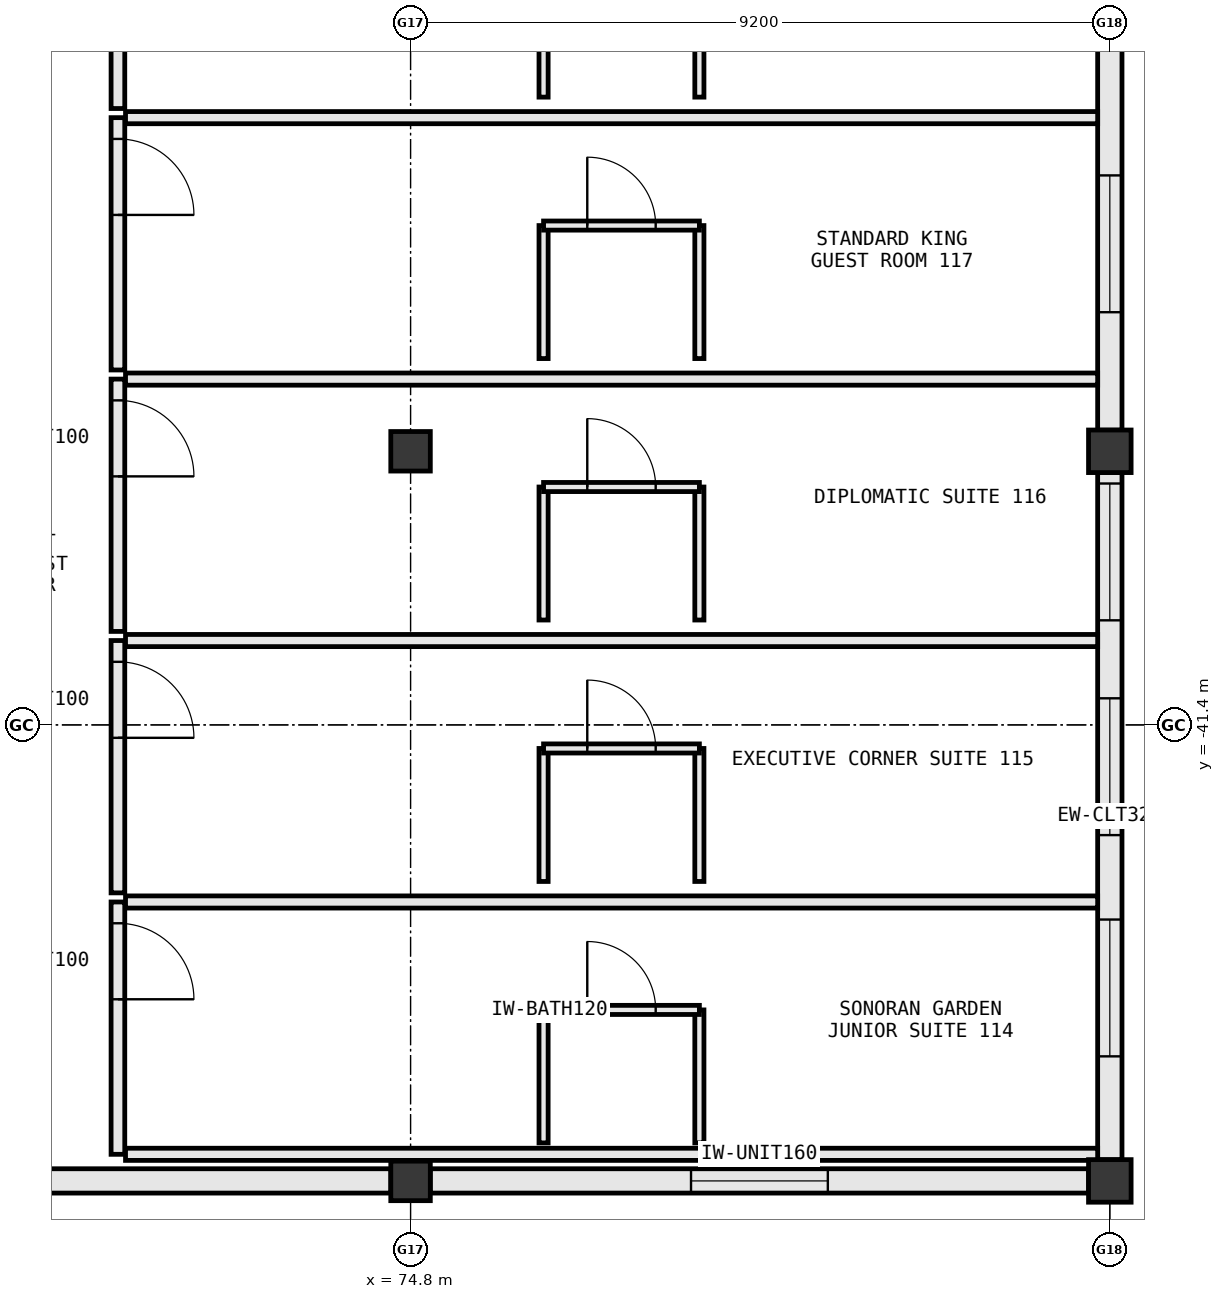
"""IFC4 building model, lengths in metres.
Left out: names, types, materials, properties, quantities, classifications, styles, units other than length and angle.
Written with IfcOpenShell. Run it as: python <this file> out.ifc"""

import sys

from ifc_helpers import new_model, si_unit, direction, frame, frame_2d, origin, origin_2d, place, context, subcontext, project, spatial, rectangle, extrude, element, fill, save


model = new_model("IFC4")
c1 = context("Model", 3, precision=1e-05, world=origin(), true_north=direction((0.0, 1.0)))
c2 = subcontext(c1, "Body", "Model", "MODEL_VIEW")
j1 = project(units=[si_unit("LENGTHUNIT", "METRE"), si_unit("PLANEANGLEUNIT", "RADIAN")], contexts=[c1])
p1 = place(None, origin())
s1 = spatial("IfcSite", under=j1, at=p1, CompositionType="ELEMENT")
p2 = place(p1, origin())
s2 = spatial("IfcBuilding", under=s1, at=p2, CompositionType="ELEMENT")
p3 = place(p2, frame((0.0, 0.0, 20.0)))
s3 = spatial("IfcBuildingStorey", under=s2, at=p3, CompositionType="ELEMENT", Elevation=20.0)
for number, where, z_axis, x_axis in (
    (1, (74.8, -47.4, 0.0), (0.0, 0.0, 1.0), (1.0, 0.0, 0.0)),
    (2, (74.8, -37.8, 0.0), (0.0, 0.0, 1.0), (1.0, 0.0, 0.0)),
):
    element("IfcColumn", number, at=place(p3, frame(where, z_axis=z_axis, x_axis=x_axis)), inside=s3, PredefinedType="COLUMN", context=c2, shape_type="SweptSolid", body=[
        extrude(rectangle(XDim=0.52, YDim=0.52, at=origin_2d()), origin(), (0.0, 0.0, 1.0), 3.8),
    ])
for number, where, z_axis, x_axis in (
    (3, (84.0, -47.4, 0.0), (0.0, 0.0, 1.0), (1.0, 0.0, 0.0)),
    (4, (84.0, -37.8, 0.0), (0.0, 0.0, 1.0), (1.0, 0.0, 0.0)),
):
    element("IfcColumn", number, at=place(p3, frame(where, z_axis=z_axis, x_axis=x_axis)), inside=s3, PredefinedType="COLUMN", context=c2, shape_type="SweptSolid", body=[
        extrude(rectangle(XDim=0.56, YDim=0.56, at=origin_2d()), origin(), (0.0, 0.0, 1.0), 3.8),
    ])
p4 = place(p3, frame((67.808, -47.4, 0.0), z_axis=(0.0, 0.0, 1.0), x_axis=(1.0, 0.0, 0.0)))
e5 = element("IfcWall", 5, at=p4, inside=s3, PredefinedType="STANDARD", context=c2, shape_type="SweptSolid", body=[
    extrude(rectangle(XDim=6.734, YDim=0.32, at=frame_2d((3.367, 0.0))), origin(), (0.0, 0.0, 1.0), 2.685),
])
p5 = place(p3, frame((75.058, -47.4, 0.0), z_axis=(0.0, 0.0, 1.0), x_axis=(1.0, 0.0, 0.0)))
e6 = element("IfcWall", 6, at=p5, inside=s3, PredefinedType="STANDARD", context=c2, shape_type="SweptSolid", body=[
    extrude(rectangle(XDim=8.664, YDim=0.32, at=frame_2d((4.332, 0.0))), origin(), (0.0, 0.0, 1.0), 2.905),
])
p6 = place(p5, frame((3.432, 0.0, 0.85)))
e7 = element("IfcOpeningElement", 7, at=p6, cuts=e6, PredefinedType="OPENING", context=c2, shape_type="SweptSolid", body=[
    extrude(rectangle(XDim=1.8, YDim=1.85, at=frame_2d((0.9, 0.925))), frame((0.0, 0.172, 0.0), z_axis=(0.0, -1.0, 0.0), x_axis=(1.0, 0.0, 0.0)), (0.0, 0.0, 1.0), 0.344),
])
p7 = place(p3, frame((84.0, -47.122, 0.0), z_axis=(0.0, 0.0, 1.0), x_axis=(0.0, 1.0, 0.0)))
e8 = element("IfcWall", 8, at=p7, inside=s3, PredefinedType="STANDARD", context=c2, shape_type="SweptSolid", body=[
    extrude(rectangle(XDim=9.044, YDim=0.32, at=frame_2d((4.522, 0.0))), origin(), (0.0, 0.0, 1.0), 2.965),
])
p8 = place(p7, frame((1.361, 0.0, 0.85)))
e9 = element("IfcOpeningElement", 9, at=p8, cuts=e8, PredefinedType="OPENING", context=c2, shape_type="SweptSolid", body=[
    extrude(rectangle(XDim=1.8, YDim=1.85, at=frame_2d((0.9, 0.925))), frame((0.0, 0.172, 0.0), z_axis=(0.0, -1.0, 0.0), x_axis=(1.0, 0.0, 0.0)), (0.0, 0.0, 1.0), 0.344),
])
p9 = place(p7, frame((4.272, 0.0, 0.85)))
e10 = element("IfcOpeningElement", 10, at=p9, cuts=e8, PredefinedType="OPENING", context=c2, shape_type="SweptSolid", body=[
    extrude(rectangle(XDim=1.8, YDim=1.85, at=frame_2d((0.9, 0.925))), frame((0.0, 0.172, 0.0), z_axis=(0.0, -1.0, 0.0), x_axis=(1.0, 0.0, 0.0)), (0.0, 0.0, 1.0), 0.344),
])
p10 = place(p7, frame((7.098, 0.0, 0.85)))
e11 = element("IfcOpeningElement", 11, at=p10, cuts=e8, PredefinedType="OPENING", context=c2, shape_type="SweptSolid", body=[
    extrude(rectangle(XDim=1.8, YDim=1.85, at=frame_2d((0.9, 0.925))), frame((0.0, 0.172, 0.0), z_axis=(0.0, -1.0, 0.0), x_axis=(1.0, 0.0, 0.0)), (0.0, 0.0, 1.0), 0.344),
])
p11 = place(p3, frame((84.0, -37.522, 0.0), z_axis=(0.0, 0.0, 1.0), x_axis=(0.0, 1.0, 0.0)))
e12 = element("IfcWall", 12, at=p11, inside=s3, PredefinedType="STANDARD", context=c2, shape_type="SweptSolid", body=[
    extrude(rectangle(XDim=9.044, YDim=0.32, at=frame_2d((4.522, 0.0))), origin(), (0.0, 0.0, 1.0), 2.965),
])
p12 = place(p11, frame((1.552, 0.0, 0.85)))
e13 = element("IfcOpeningElement", 13, at=p12, cuts=e12, PredefinedType="OPENING", context=c2, shape_type="SweptSolid", body=[
    extrude(rectangle(XDim=1.8, YDim=1.85, at=frame_2d((0.9, 0.925))), frame((0.0, 0.172, 0.0), z_axis=(0.0, -1.0, 0.0), x_axis=(1.0, 0.0, 0.0)), (0.0, 0.0, 1.0), 0.344),
])
p13 = place(p11, frame((4.992, 0.0, 0.85)))
e14 = element("IfcOpeningElement", 14, at=p13, cuts=e12, PredefinedType="OPENING", context=c2, shape_type="SweptSolid", body=[
    extrude(rectangle(XDim=1.8, YDim=1.85, at=frame_2d((0.9, 0.925))), frame((0.0, 0.172, 0.0), z_axis=(0.0, -1.0, 0.0), x_axis=(1.0, 0.0, 0.0)), (0.0, 0.0, 1.0), 0.344),
])
p14 = place(p3, frame((70.95, -43.73, 0.0), z_axis=(0.0, 0.0, 1.0), x_axis=(0.0, -1.0, 0.0)))
e15 = element("IfcWall", 15, at=p14, inside=s3, PredefinedType="PARTITIONING", context=c2, shape_type="SweptSolid", body=[
    extrude(rectangle(XDim=3.32, YDim=0.18, at=frame_2d((1.66, 0.0))), origin(), (0.0, 0.0, 1.0), 3.55),
])
p15 = place(p14, frame((0.28, 0.0, 0.0)))
e16 = element("IfcOpeningElement", 16, at=p15, cuts=e15, PredefinedType="OPENING", context=c2, shape_type="SweptSolid", body=[
    extrude(rectangle(XDim=1.0, YDim=2.2, at=frame_2d((0.5, 1.1))), frame((0.0, 0.102, 0.0), z_axis=(0.0, -1.0, 0.0), x_axis=(1.0, 0.0, 0.0)), (0.0, 0.0, 1.0), 0.204),
])
p16 = place(p3, frame((71.05, -47.05, 0.0), z_axis=(0.0, 0.0, 1.0), x_axis=(1.0, 0.0, 0.0)))
e17 = element("IfcWall", 17, at=p16, inside=s3, PredefinedType="PARTITIONING", context=c2, shape_type="SweptSolid", body=[
    extrude(rectangle(XDim=12.79, YDim=0.16, at=frame_2d((6.395, 0.0))), origin(), (0.0, 0.0, 1.0), 2.685),
])
p17 = place(p3, frame((71.05, -43.73, 0.0), z_axis=(0.0, 0.0, 1.0), x_axis=(1.0, 0.0, 0.0)))
e18 = element("IfcWall", 18, at=p17, inside=s3, PredefinedType="PARTITIONING", context=c2, shape_type="SweptSolid", body=[
    extrude(rectangle(XDim=12.79, YDim=0.16, at=frame_2d((6.395, 0.0))), origin(), (0.0, 0.0, 1.0), 3.55),
])
for number, where, z_axis, x_axis in (
    (19, (76.55, -46.9, 0.0), (0.0, 0.0, 1.0), (0.0, 1.0, 0.0)),
    (20, (78.6, -46.9, 0.0), (0.0, 0.0, 1.0), (0.0, 1.0, 0.0)),
):
    element("IfcWall", number, at=place(p3, frame(where, z_axis=z_axis, x_axis=x_axis)), inside=s3, PredefinedType="PARTITIONING", context=c2, shape_type="SweptSolid", body=[
        extrude(rectangle(XDim=1.75, YDim=0.12, at=frame_2d((0.875, 0.0))), origin(), (0.0, 0.0, 1.0), 3.55),
    ])
p18 = place(p3, frame((76.55, -45.15, 0.0), z_axis=(0.0, 0.0, 1.0), x_axis=(1.0, 0.0, 0.0)))
e21 = element("IfcWall", 21, at=p18, inside=s3, PredefinedType="PARTITIONING", context=c2, shape_type="SweptSolid", body=[
    extrude(rectangle(XDim=2.05, YDim=0.12, at=frame_2d((1.025, 0.0))), origin(), (0.0, 0.0, 1.0), 3.55),
])
p19 = place(p18, frame((0.575, 0.0, 0.0)))
e22 = element("IfcOpeningElement", 22, at=p19, cuts=e21, PredefinedType="OPENING", context=c2, shape_type="SweptSolid", body=[
    extrude(rectangle(XDim=0.9, YDim=2.15, at=frame_2d((0.45, 1.075))), frame((0.0, 0.072, 0.0), z_axis=(0.0, -1.0, 0.0), x_axis=(1.0, 0.0, 0.0)), (0.0, 0.0, 1.0), 0.144),
])
p20 = place(p3, frame((70.95, -40.29, 0.0), z_axis=(0.0, 0.0, 1.0), x_axis=(0.0, -1.0, 0.0)))
e23 = element("IfcWall", 23, at=p20, inside=s3, PredefinedType="PARTITIONING", context=c2, shape_type="SweptSolid", body=[
    extrude(rectangle(XDim=3.32, YDim=0.18, at=frame_2d((1.66, 0.0))), origin(), (0.0, 0.0, 1.0), 3.55),
])
p21 = place(p20, frame((0.28, 0.0, 0.0)))
e24 = element("IfcOpeningElement", 24, at=p21, cuts=e23, PredefinedType="OPENING", context=c2, shape_type="SweptSolid", body=[
    extrude(rectangle(XDim=1.0, YDim=2.2, at=frame_2d((0.5, 1.1))), frame((0.0, 0.102, 0.0), z_axis=(0.0, -1.0, 0.0), x_axis=(1.0, 0.0, 0.0)), (0.0, 0.0, 1.0), 0.204),
])
p22 = place(p3, frame((71.05, -40.29, 0.0), z_axis=(0.0, 0.0, 1.0), x_axis=(1.0, 0.0, 0.0)))
e25 = element("IfcWall", 25, at=p22, inside=s3, PredefinedType="PARTITIONING", context=c2, shape_type="SweptSolid", body=[
    extrude(rectangle(XDim=12.79, YDim=0.16, at=frame_2d((6.395, 0.0))), origin(), (0.0, 0.0, 1.0), 3.55),
])
for number, where, z_axis, x_axis in (
    (26, (76.55, -43.46, 0.0), (0.0, 0.0, 1.0), (0.0, 1.0, 0.0)),
    (27, (78.6, -43.46, 0.0), (0.0, 0.0, 1.0), (0.0, 1.0, 0.0)),
):
    element("IfcWall", number, at=place(p3, frame(where, z_axis=z_axis, x_axis=x_axis)), inside=s3, PredefinedType="PARTITIONING", context=c2, shape_type="SweptSolid", body=[
        extrude(rectangle(XDim=1.75, YDim=0.12, at=frame_2d((0.875, 0.0))), origin(), (0.0, 0.0, 1.0), 3.55),
    ])
p23 = place(p3, frame((76.55, -41.71, 0.0), z_axis=(0.0, 0.0, 1.0), x_axis=(1.0, 0.0, 0.0)))
e28 = element("IfcWall", 28, at=p23, inside=s3, PredefinedType="PARTITIONING", context=c2, shape_type="SweptSolid", body=[
    extrude(rectangle(XDim=2.05, YDim=0.12, at=frame_2d((1.025, 0.0))), origin(), (0.0, 0.0, 1.0), 3.55),
])
p24 = place(p23, frame((0.575, 0.0, 0.0)))
e29 = element("IfcOpeningElement", 29, at=p24, cuts=e28, PredefinedType="OPENING", context=c2, shape_type="SweptSolid", body=[
    extrude(rectangle(XDim=0.9, YDim=2.15, at=frame_2d((0.45, 1.075))), frame((0.0, 0.072, 0.0), z_axis=(0.0, -1.0, 0.0), x_axis=(1.0, 0.0, 0.0)), (0.0, 0.0, 1.0), 0.144),
])
p25 = place(p3, frame((70.95, -36.85, 0.0), z_axis=(0.0, 0.0, 1.0), x_axis=(0.0, -1.0, 0.0)))
e30 = element("IfcWall", 30, at=p25, inside=s3, PredefinedType="PARTITIONING", context=c2, shape_type="SweptSolid", body=[
    extrude(rectangle(XDim=3.32, YDim=0.18, at=frame_2d((1.66, 0.0))), origin(), (0.0, 0.0, 1.0), 3.55),
])
p26 = place(p25, frame((0.28, 0.0, 0.0)))
e31 = element("IfcOpeningElement", 31, at=p26, cuts=e30, PredefinedType="OPENING", context=c2, shape_type="SweptSolid", body=[
    extrude(rectangle(XDim=1.0, YDim=2.2, at=frame_2d((0.5, 1.1))), frame((0.0, 0.102, 0.0), z_axis=(0.0, -1.0, 0.0), x_axis=(1.0, 0.0, 0.0)), (0.0, 0.0, 1.0), 0.204),
])
p27 = place(p3, frame((71.05, -36.85, 0.0), z_axis=(0.0, 0.0, 1.0), x_axis=(1.0, 0.0, 0.0)))
e32 = element("IfcWall", 32, at=p27, inside=s3, PredefinedType="PARTITIONING", context=c2, shape_type="SweptSolid", body=[
    extrude(rectangle(XDim=12.79, YDim=0.16, at=frame_2d((6.395, 0.0))), origin(), (0.0, 0.0, 1.0), 3.55),
])
for number, where, z_axis, x_axis in (
    (33, (76.55, -40.02, 0.0), (0.0, 0.0, 1.0), (0.0, 1.0, 0.0)),
    (34, (78.6, -40.02, 0.0), (0.0, 0.0, 1.0), (0.0, 1.0, 0.0)),
):
    element("IfcWall", number, at=place(p3, frame(where, z_axis=z_axis, x_axis=x_axis)), inside=s3, PredefinedType="PARTITIONING", context=c2, shape_type="SweptSolid", body=[
        extrude(rectangle(XDim=1.75, YDim=0.12, at=frame_2d((0.875, 0.0))), origin(), (0.0, 0.0, 1.0), 3.55),
    ])
p28 = place(p3, frame((76.55, -38.27, 0.0), z_axis=(0.0, 0.0, 1.0), x_axis=(1.0, 0.0, 0.0)))
e35 = element("IfcWall", 35, at=p28, inside=s3, PredefinedType="PARTITIONING", context=c2, shape_type="SweptSolid", body=[
    extrude(rectangle(XDim=2.05, YDim=0.12, at=frame_2d((1.025, 0.0))), origin(), (0.0, 0.0, 1.0), 3.55),
])
p29 = place(p28, frame((0.575, 0.0, 0.0)))
e36 = element("IfcOpeningElement", 36, at=p29, cuts=e35, PredefinedType="OPENING", context=c2, shape_type="SweptSolid", body=[
    extrude(rectangle(XDim=0.9, YDim=2.15, at=frame_2d((0.45, 1.075))), frame((0.0, 0.072, 0.0), z_axis=(0.0, -1.0, 0.0), x_axis=(1.0, 0.0, 0.0)), (0.0, 0.0, 1.0), 0.144),
])
p30 = place(p3, frame((70.95, -33.41, 0.0), z_axis=(0.0, 0.0, 1.0), x_axis=(0.0, -1.0, 0.0)))
e37 = element("IfcWall", 37, at=p30, inside=s3, PredefinedType="PARTITIONING", context=c2, shape_type="SweptSolid", body=[
    extrude(rectangle(XDim=3.32, YDim=0.18, at=frame_2d((1.66, 0.0))), origin(), (0.0, 0.0, 1.0), 3.55),
])
p31 = place(p30, frame((0.28, 0.0, 0.0)))
e38 = element("IfcOpeningElement", 38, at=p31, cuts=e37, PredefinedType="OPENING", context=c2, shape_type="SweptSolid", body=[
    extrude(rectangle(XDim=1.0, YDim=2.2, at=frame_2d((0.5, 1.1))), frame((0.0, 0.102, 0.0), z_axis=(0.0, -1.0, 0.0), x_axis=(1.0, 0.0, 0.0)), (0.0, 0.0, 1.0), 0.204),
])
p32 = place(p3, frame((71.05, -33.41, 0.0), z_axis=(0.0, 0.0, 1.0), x_axis=(1.0, 0.0, 0.0)))
e39 = element("IfcWall", 39, at=p32, inside=s3, PredefinedType="PARTITIONING", context=c2, shape_type="SweptSolid", body=[
    extrude(rectangle(XDim=12.79, YDim=0.16, at=frame_2d((6.395, 0.0))), origin(), (0.0, 0.0, 1.0), 3.55),
])
for number, where, z_axis, x_axis in (
    (40, (76.55, -36.58, 0.0), (0.0, 0.0, 1.0), (0.0, 1.0, 0.0)),
    (41, (78.6, -36.58, 0.0), (0.0, 0.0, 1.0), (0.0, 1.0, 0.0)),
):
    element("IfcWall", number, at=place(p3, frame(where, z_axis=z_axis, x_axis=x_axis)), inside=s3, PredefinedType="PARTITIONING", context=c2, shape_type="SweptSolid", body=[
        extrude(rectangle(XDim=1.75, YDim=0.12, at=frame_2d((0.875, 0.0))), origin(), (0.0, 0.0, 1.0), 3.55),
    ])
p33 = place(p3, frame((76.55, -34.83, 0.0), z_axis=(0.0, 0.0, 1.0), x_axis=(1.0, 0.0, 0.0)))
e42 = element("IfcWall", 42, at=p33, inside=s3, PredefinedType="PARTITIONING", context=c2, shape_type="SweptSolid", body=[
    extrude(rectangle(XDim=2.05, YDim=0.12, at=frame_2d((1.025, 0.0))), origin(), (0.0, 0.0, 1.0), 3.55),
])
p34 = place(p33, frame((0.575, 0.0, 0.0)))
e43 = element("IfcOpeningElement", 43, at=p34, cuts=e42, PredefinedType="OPENING", context=c2, shape_type="SweptSolid", body=[
    extrude(rectangle(XDim=0.9, YDim=2.15, at=frame_2d((0.45, 1.075))), frame((0.0, 0.072, 0.0), z_axis=(0.0, -1.0, 0.0), x_axis=(1.0, 0.0, 0.0)), (0.0, 0.0, 1.0), 0.144),
])
p35 = place(p3, frame((70.95, -29.97, 0.0), z_axis=(0.0, 0.0, 1.0), x_axis=(0.0, -1.0, 0.0)))
e44 = element("IfcWall", 44, at=p35, inside=s3, PredefinedType="PARTITIONING", context=c2, shape_type="SweptSolid", body=[
    extrude(rectangle(XDim=3.32, YDim=0.18, at=frame_2d((1.66, 0.0))), origin(), (0.0, 0.0, 1.0), 3.55),
])
p36 = place(p35, frame((0.28, 0.0, 0.0)))
e45 = element("IfcOpeningElement", 45, at=p36, cuts=e44, PredefinedType="OPENING", context=c2, shape_type="SweptSolid", body=[
    extrude(rectangle(XDim=1.0, YDim=2.2, at=frame_2d((0.5, 1.1))), frame((0.0, 0.102, 0.0), z_axis=(0.0, -1.0, 0.0), x_axis=(1.0, 0.0, 0.0)), (0.0, 0.0, 1.0), 0.204),
])
for number, where, z_axis, x_axis in (
    (46, (76.55, -33.14, 0.0), (0.0, 0.0, 1.0), (0.0, 1.0, 0.0)),
    (47, (78.6, -33.14, 0.0), (0.0, 0.0, 1.0), (0.0, 1.0, 0.0)),
):
    element("IfcWall", number, at=place(p3, frame(where, z_axis=z_axis, x_axis=x_axis)), inside=s3, PredefinedType="PARTITIONING", context=c2, shape_type="SweptSolid", body=[
        extrude(rectangle(XDim=1.75, YDim=0.12, at=frame_2d((0.875, 0.0))), origin(), (0.0, 0.0, 1.0), 3.55),
    ])
p37 = place(p6, origin())
e48 = element("IfcWindow", 48, at=p37, inside=s3, PartitioningType="SINGLE_PANEL", PredefinedType="WINDOW", context=c2, shape_type="SweptSolid", body=[
    extrude(rectangle(XDim=1.8, YDim=1.85, at=frame_2d((0.9, 0.925))), frame((0.0, 0.03, 0.0), z_axis=(0.0, -1.0, 0.0), x_axis=(1.0, 0.0, 0.0)), (0.0, 0.0, 1.0), 0.06),
])
fill(e7, e48)
p38 = place(p8, origin())
e49 = element("IfcWindow", 49, at=p38, inside=s3, PartitioningType="SINGLE_PANEL", PredefinedType="WINDOW", context=c2, shape_type="SweptSolid", body=[
    extrude(rectangle(XDim=1.8, YDim=1.85, at=frame_2d((0.9, 0.925))), frame((0.0, 0.03, 0.0), z_axis=(0.0, -1.0, 0.0), x_axis=(1.0, 0.0, 0.0)), (0.0, 0.0, 1.0), 0.06),
])
fill(e9, e49)
p39 = place(p9, origin())
e50 = element("IfcWindow", 50, at=p39, inside=s3, PartitioningType="SINGLE_PANEL", PredefinedType="WINDOW", context=c2, shape_type="SweptSolid", body=[
    extrude(rectangle(XDim=1.8, YDim=1.85, at=frame_2d((0.9, 0.925))), frame((0.0, 0.03, 0.0), z_axis=(0.0, -1.0, 0.0), x_axis=(1.0, 0.0, 0.0)), (0.0, 0.0, 1.0), 0.06),
])
fill(e10, e50)
p40 = place(p10, origin())
e51 = element("IfcWindow", 51, at=p40, inside=s3, PartitioningType="SINGLE_PANEL", PredefinedType="WINDOW", context=c2, shape_type="SweptSolid", body=[
    extrude(rectangle(XDim=1.8, YDim=1.85, at=frame_2d((0.9, 0.925))), frame((0.0, 0.03, 0.0), z_axis=(0.0, -1.0, 0.0), x_axis=(1.0, 0.0, 0.0)), (0.0, 0.0, 1.0), 0.06),
])
fill(e11, e51)
p41 = place(p12, origin())
e52 = element("IfcWindow", 52, at=p41, inside=s3, PartitioningType="SINGLE_PANEL", PredefinedType="WINDOW", context=c2, shape_type="SweptSolid", body=[
    extrude(rectangle(XDim=1.8, YDim=1.85, at=frame_2d((0.9, 0.925))), frame((0.0, 0.03, 0.0), z_axis=(0.0, -1.0, 0.0), x_axis=(1.0, 0.0, 0.0)), (0.0, 0.0, 1.0), 0.06),
])
fill(e13, e52)
p42 = place(p15, origin())
e53 = element("IfcDoor", 53, at=p42, inside=s3, OperationType="SINGLE_SWING_RIGHT", PredefinedType="DOOR", context=c2, shape_type="SweptSolid", body=[
    extrude(rectangle(XDim=1.0, YDim=2.2, at=frame_2d((0.5, 1.1))), frame((0.0, 0.025, 0.0), z_axis=(0.0, -1.0, 0.0), x_axis=(1.0, 0.0, 0.0)), (0.0, 0.0, 1.0), 0.05),
])
fill(e16, e53)
p43 = place(p19, origin())
e54 = element("IfcDoor", 54, at=p43, inside=s3, OperationType="SINGLE_SWING_LEFT", PredefinedType="DOOR", context=c2, shape_type="SweptSolid", body=[
    extrude(rectangle(XDim=0.9, YDim=2.15, at=frame_2d((0.45, 1.075))), frame((0.0, 0.025, 0.0), z_axis=(0.0, -1.0, 0.0), x_axis=(1.0, 0.0, 0.0)), (0.0, 0.0, 1.0), 0.05),
])
fill(e22, e54)
p44 = place(p21, origin())
e55 = element("IfcDoor", 55, at=p44, inside=s3, OperationType="SINGLE_SWING_RIGHT", PredefinedType="DOOR", context=c2, shape_type="SweptSolid", body=[
    extrude(rectangle(XDim=1.0, YDim=2.2, at=frame_2d((0.5, 1.1))), frame((0.0, 0.025, 0.0), z_axis=(0.0, -1.0, 0.0), x_axis=(1.0, 0.0, 0.0)), (0.0, 0.0, 1.0), 0.05),
])
fill(e24, e55)
p45 = place(p24, origin())
e56 = element("IfcDoor", 56, at=p45, inside=s3, OperationType="SINGLE_SWING_LEFT", PredefinedType="DOOR", context=c2, shape_type="SweptSolid", body=[
    extrude(rectangle(XDim=0.9, YDim=2.15, at=frame_2d((0.45, 1.075))), frame((0.0, 0.025, 0.0), z_axis=(0.0, -1.0, 0.0), x_axis=(1.0, 0.0, 0.0)), (0.0, 0.0, 1.0), 0.05),
])
fill(e29, e56)
p46 = place(p26, origin())
e57 = element("IfcDoor", 57, at=p46, inside=s3, OperationType="SINGLE_SWING_RIGHT", PredefinedType="DOOR", context=c2, shape_type="SweptSolid", body=[
    extrude(rectangle(XDim=1.0, YDim=2.2, at=frame_2d((0.5, 1.1))), frame((0.0, 0.025, 0.0), z_axis=(0.0, -1.0, 0.0), x_axis=(1.0, 0.0, 0.0)), (0.0, 0.0, 1.0), 0.05),
])
fill(e31, e57)
p47 = place(p29, origin())
e58 = element("IfcDoor", 58, at=p47, inside=s3, OperationType="SINGLE_SWING_LEFT", PredefinedType="DOOR", context=c2, shape_type="SweptSolid", body=[
    extrude(rectangle(XDim=0.9, YDim=2.15, at=frame_2d((0.45, 1.075))), frame((0.0, 0.025, 0.0), z_axis=(0.0, -1.0, 0.0), x_axis=(1.0, 0.0, 0.0)), (0.0, 0.0, 1.0), 0.05),
])
fill(e36, e58)
p48 = place(p31, origin())
e59 = element("IfcDoor", 59, at=p48, inside=s3, OperationType="SINGLE_SWING_RIGHT", PredefinedType="DOOR", context=c2, shape_type="SweptSolid", body=[
    extrude(rectangle(XDim=1.0, YDim=2.2, at=frame_2d((0.5, 1.1))), frame((0.0, 0.025, 0.0), z_axis=(0.0, -1.0, 0.0), x_axis=(1.0, 0.0, 0.0)), (0.0, 0.0, 1.0), 0.05),
])
fill(e38, e59)
p49 = place(p34, origin())
e60 = element("IfcDoor", 60, at=p49, inside=s3, OperationType="SINGLE_SWING_LEFT", PredefinedType="DOOR", context=c2, shape_type="SweptSolid", body=[
    extrude(rectangle(XDim=0.9, YDim=2.15, at=frame_2d((0.45, 1.075))), frame((0.0, 0.025, 0.0), z_axis=(0.0, -1.0, 0.0), x_axis=(1.0, 0.0, 0.0)), (0.0, 0.0, 1.0), 0.05),
])
fill(e43, e60)
save(model, sys.argv[1])
